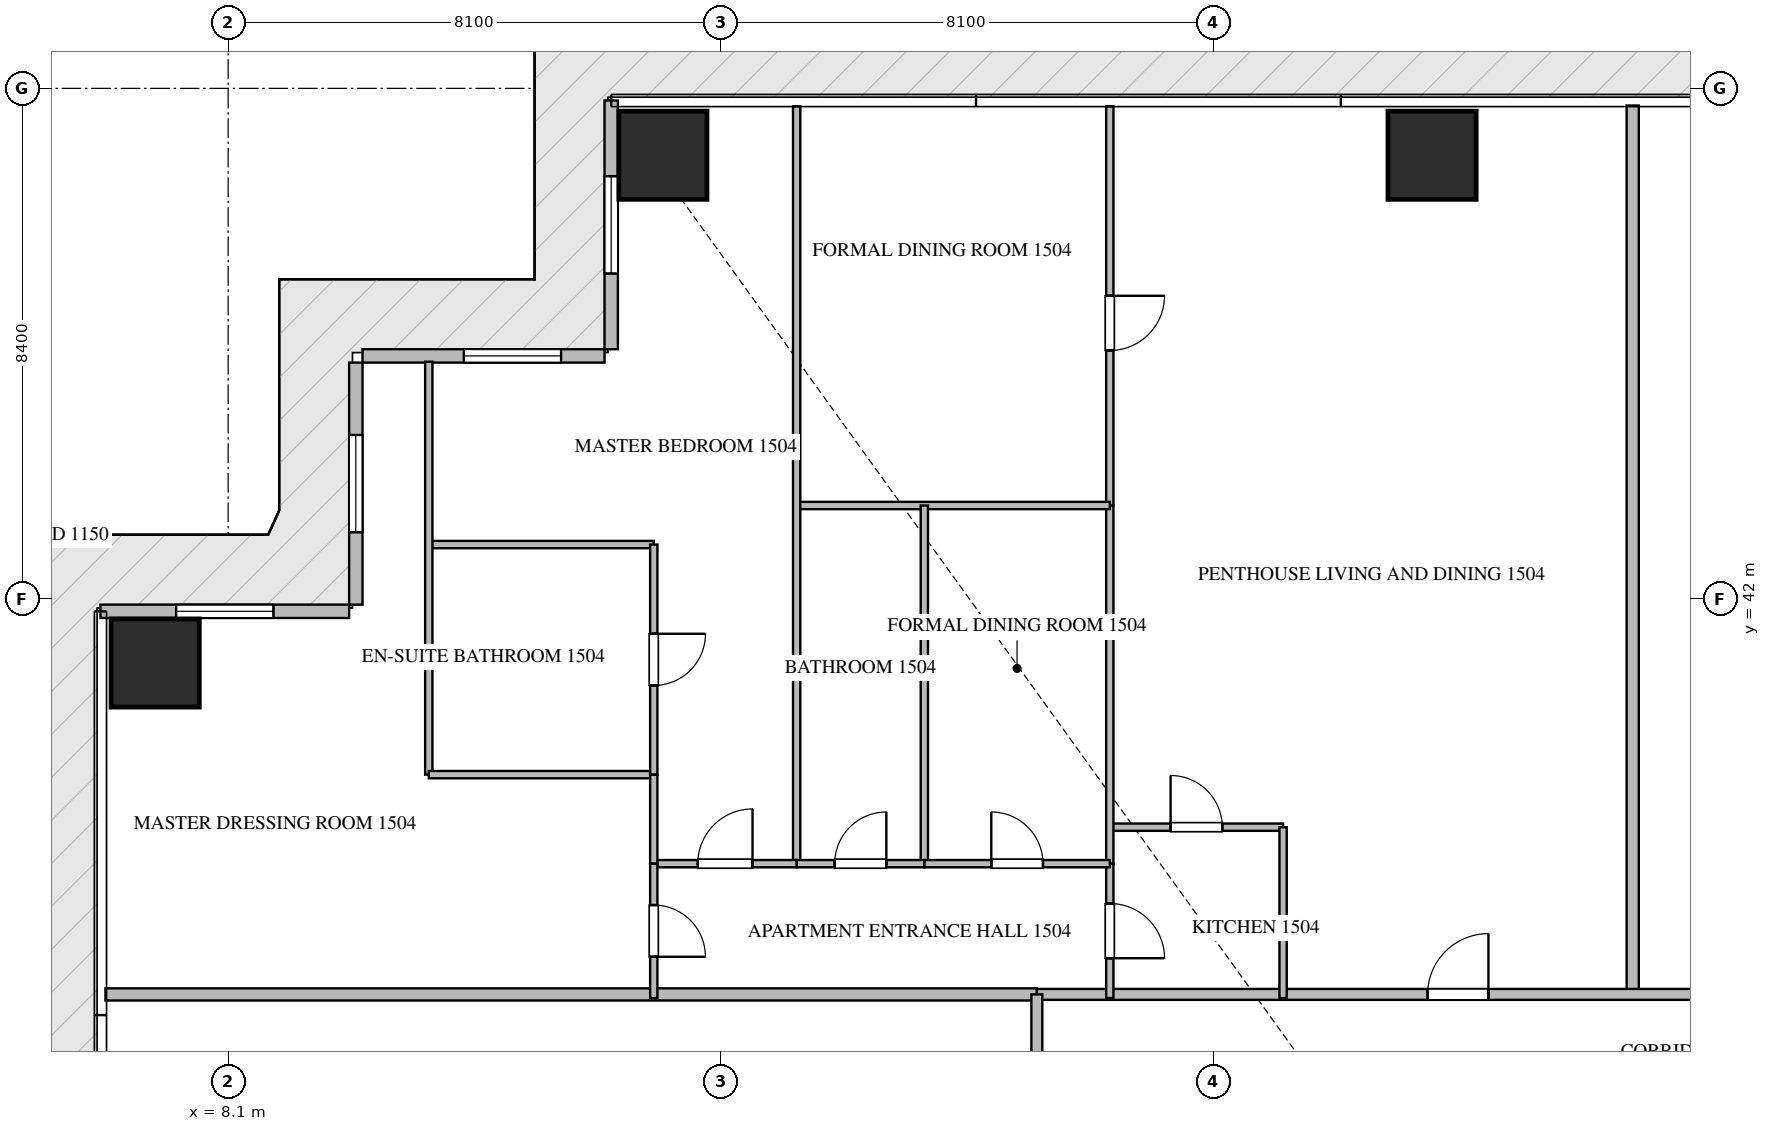
"""IFC4 building model, lengths in metres.
Left out: names, types, materials, properties, quantities, classifications, styles, units other than length and angle.
Written with IfcOpenShell. Run it as: python <this file> out.ifc"""

import sys

from ifc_helpers import new_model, si_unit, direction, frame, frame_2d, origin, origin_2d, place, context, subcontext, project, spatial, rectangle, extrude, source, transform, mapped, element, fill, save


model = new_model("IFC4")
c1 = context("Model", 3, precision=1e-05, world=origin(), true_north=direction((0.0, 1.0)))
c2 = subcontext(c1, "Body", "Model", "MODEL_VIEW")
j1 = project(units=[si_unit("LENGTHUNIT", "METRE"), si_unit("PLANEANGLEUNIT", "RADIAN")], contexts=[c1])
p1 = place(None, origin())
s1 = spatial("IfcSite", under=j1, at=p1, CompositionType="ELEMENT")
p2 = place(p1, origin())
s2 = spatial("IfcBuilding", under=s1, at=p2, CompositionType="ELEMENT")
p3 = place(p2, frame((0.0, 0.0, 64.2)))
s3 = spatial("IfcBuildingStorey", under=s2, at=p3, CompositionType="ELEMENT", Elevation=64.2)
m1 = source(origin(), c2, "Body", "SweptSolid", [
    extrude(rectangle(XDim=1.45, YDim=1.45, at=origin_2d()), origin(), (0.0, 0.0, 1.0), 3.75),
])
for number, where, z_axis, x_axis in (
    (1, (15.25, 49.3, -0.26), (0.0, 0.0, 1.0), (1.0, 0.0, 0.0)),
    (2, (27.9, 49.3, -0.26), (0.0, 0.0, 1.0), (1.0, 0.0, 0.0)),
    (3, (6.9, 40.95, -0.26), (0.0, 0.0, 1.0), (1.0, 0.0, 0.0)),
):
    element("IfcColumn", number, at=place(p3, frame(where, z_axis=z_axis, x_axis=x_axis)), inside=s3, PredefinedType="COLUMN", context=c2, shape_type="MappedRepresentation", body=[
        mapped(m1, transform((0.0, 0.0, 0.0), scale=1.0)),
    ])
p4 = place(p3, frame((14.4, 50.2, 0.0), z_axis=(0.0, 0.0, 1.0), x_axis=(0.0, -1.0, 0.0)))
e4 = element("IfcWall", 4, at=p4, inside=s3, PredefinedType="ELEMENTEDWALL", context=c2, shape_type="SweptSolid", body=[
    extrude(rectangle(XDim=4.09, YDim=0.22, at=frame_2d((2.045, 0.0))), origin(), (0.0, 0.0, 1.0), 3.475),
])
p5 = place(p4, frame((1.245, 0.0, 0.65)))
e5 = element("IfcOpeningElement", 5, at=p5, cuts=e4, PredefinedType="OPENING", context=c2, shape_type="SweptSolid", body=[
    extrude(rectangle(XDim=1.6, YDim=2.1, at=frame_2d((0.8, 1.05))), frame((0.0, 0.12, 0.0), z_axis=(0.0, -1.0, 0.0), x_axis=(1.0, 0.0, 0.0)), (0.0, 0.0, 1.0), 0.24),
])
p6 = place(p3, frame((14.29, 46.0, 0.0), z_axis=(0.0, 0.0, 1.0), x_axis=(-1.0, 0.0, 0.0)))
e6 = element("IfcWall", 6, at=p6, inside=s3, PredefinedType="ELEMENTEDWALL", context=c2, shape_type="SweptSolid", body=[
    extrude(rectangle(XDim=3.98, YDim=0.22, at=frame_2d((1.99, 0.0))), origin(), (0.0, 0.0, 1.0), 3.475),
])
p7 = place(p6, frame((0.714, 0.0, 0.65)))
e7 = element("IfcOpeningElement", 7, at=p7, cuts=e6, PredefinedType="OPENING", context=c2, shape_type="SweptSolid", body=[
    extrude(rectangle(XDim=1.6, YDim=2.1, at=frame_2d((0.8, 1.05))), frame((0.0, 0.12, 0.0), z_axis=(0.0, -1.0, 0.0), x_axis=(1.0, 0.0, 0.0)), (0.0, 0.0, 1.0), 0.24),
])
p8 = place(p3, frame((10.2, 45.89, 0.0), z_axis=(0.0, 0.0, 1.0), x_axis=(0.0, -1.0, 0.0)))
e8 = element("IfcWall", 8, at=p8, inside=s3, PredefinedType="ELEMENTEDWALL", context=c2, shape_type="SweptSolid", body=[
    extrude(rectangle(XDim=3.98, YDim=0.22, at=frame_2d((1.99, 0.0))), origin(), (0.0, 0.0, 1.0), 3.475),
])
p9 = place(p8, frame((1.19, 0.0, 0.65)))
e9 = element("IfcOpeningElement", 9, at=p9, cuts=e8, PredefinedType="OPENING", context=c2, shape_type="SweptSolid", body=[
    extrude(rectangle(XDim=1.6, YDim=2.1, at=frame_2d((0.8, 1.05))), frame((0.0, 0.12, 0.0), z_axis=(0.0, -1.0, 0.0), x_axis=(1.0, 0.0, 0.0)), (0.0, 0.0, 1.0), 0.24),
])
p10 = place(p3, frame((10.09, 41.8, 0.0), z_axis=(0.0, 0.0, 1.0), x_axis=(-1.0, 0.0, 0.0)))
e10 = element("IfcWall", 10, at=p10, inside=s3, PredefinedType="ELEMENTEDWALL", context=c2, shape_type="SweptSolid", body=[
    extrude(rectangle(XDim=4.09, YDim=0.22, at=frame_2d((2.045, 0.0))), origin(), (0.0, 0.0, 1.0), 3.475),
])
p11 = place(p10, frame((1.245, 0.0, 0.65)))
e11 = element("IfcOpeningElement", 11, at=p11, cuts=e10, PredefinedType="OPENING", context=c2, shape_type="SweptSolid", body=[
    extrude(rectangle(XDim=1.6, YDim=2.1, at=frame_2d((0.8, 1.05))), frame((0.0, 0.12, 0.0), z_axis=(0.0, -1.0, 0.0), x_axis=(1.0, 0.0, 0.0)), (0.0, 0.0, 1.0), 0.24),
])
p12 = place(p3, frame((31.2, 35.5, 0.0), z_axis=(0.0, 0.0, 1.0), x_axis=(0.0, 1.0, 0.0)))
e12 = element("IfcWall", 12, at=p12, inside=s3, PredefinedType="PARTITIONING", context=c2, shape_type="SweptSolid", body=[
    extrude(rectangle(XDim=14.618, YDim=0.2, at=frame_2d((7.309, 0.0))), origin(), (0.0, 0.0, 1.0), 3.49),
])
p13 = place(p3, frame((6.082, 35.5, 0.0), z_axis=(0.0, 0.0, 1.0), x_axis=(1.0, 0.0, 0.0)))
e13 = element("IfcWall", 13, at=p13, inside=s3, PredefinedType="PARTITIONING", context=c2, shape_type="SweptSolid", body=[
    extrude(rectangle(XDim=15.318, YDim=0.2, at=frame_2d((7.659, 0.0))), origin(), (0.0, 0.0, 1.0), 3.49),
])
p14 = place(p3, frame((21.402, 35.5, 0.0), z_axis=(0.0, 0.0, 1.0), x_axis=(1.0, 0.0, 0.0)))
e14 = element("IfcWall", 14, at=p14, inside=s3, PredefinedType="PARTITIONING", context=c2, shape_type="SweptSolid", body=[
    extrude(rectangle(XDim=21.996, YDim=0.18, at=frame_2d((10.998, 0.0))), origin(), (0.0, 0.0, 1.0), 3.49),
])
p15 = place(p14, frame((6.425, 0.0, 0.0)))
e15 = element("IfcOpeningElement", 15, at=p15, cuts=e14, PredefinedType="OPENING", context=c2, shape_type="SweptSolid", body=[
    extrude(rectangle(XDim=1.0, YDim=2.15, at=frame_2d((0.5, 1.075))), frame((0.0, 0.1, 0.0), z_axis=(0.0, -1.0, 0.0), x_axis=(1.0, 0.0, 0.0)), (0.0, 0.0, 1.0), 0.2),
])
p16 = place(p14, frame((13.605, 0.0, 0.0)))
e16 = element("IfcOpeningElement", 16, at=p16, cuts=e14, PredefinedType="OPENING", context=c2, shape_type="SweptSolid", body=[
    extrude(rectangle(XDim=1.0, YDim=2.15, at=frame_2d((0.5, 1.075))), frame((0.0, 0.1, 0.0), z_axis=(0.0, -1.0, 0.0), x_axis=(1.0, 0.0, 0.0)), (0.0, 0.0, 1.0), 0.2),
])
p17 = place(p3, frame((21.4, 14.9, 0.0), z_axis=(0.0, 0.0, 1.0), x_axis=(0.0, 1.0, 0.0)))
e17 = element("IfcWall", 17, at=p17, inside=s3, PredefinedType="PARTITIONING", context=c2, shape_type="SweptSolid", body=[
    extrude(rectangle(XDim=20.6, YDim=0.18, at=frame_2d((10.3, 0.0))), origin(), (0.0, 0.0, 1.0), 3.49),
])
p18 = place(p17, frame((5.919, 0.0, 0.0)))
e18 = element("IfcOpeningElement", 18, at=p18, cuts=e17, PredefinedType="OPENING", context=c2, shape_type="SweptSolid", body=[
    extrude(rectangle(XDim=1.0, YDim=2.15, at=frame_2d((0.5, 1.075))), frame((0.0, 0.1, 0.0), z_axis=(0.0, -1.0, 0.0), x_axis=(1.0, 0.0, 0.0)), (0.0, 0.0, 1.0), 0.2),
])
p19 = place(p17, frame((17.64, 0.0, 0.0)))
e19 = element("IfcOpeningElement", 19, at=p19, cuts=e17, PredefinedType="OPENING", context=c2, shape_type="SweptSolid", body=[
    extrude(rectangle(XDim=1.0, YDim=2.15, at=frame_2d((0.5, 1.075))), frame((0.0, 0.1, 0.0), z_axis=(0.0, -1.0, 0.0), x_axis=(1.0, 0.0, 0.0)), (0.0, 0.0, 1.0), 0.2),
])
p20 = place(p3, frame((22.6, 38.25, 0.0), z_axis=(0.0, 0.0, 1.0), x_axis=(1.0, 0.0, 0.0)))
e20 = element("IfcWall", 20, at=p20, inside=s3, PredefinedType="PARTITIONING", context=c2, shape_type="SweptSolid", body=[
    extrude(rectangle(XDim=2.85, YDim=0.12, at=frame_2d((1.425, 0.0))), origin(), (0.0, 0.0, 1.0), 3.49),
])
p21 = place(p20, frame((1.0, 0.0, 0.0)))
e21 = element("IfcOpeningElement", 21, at=p21, cuts=e20, PredefinedType="OPENING", context=c2, shape_type="SweptSolid", body=[
    extrude(rectangle(XDim=0.85, YDim=2.1, at=frame_2d((0.425, 1.05))), frame((0.0, 0.07, 0.0), z_axis=(0.0, -1.0, 0.0), x_axis=(1.0, 0.0, 0.0)), (0.0, 0.0, 1.0), 0.14),
])
p22 = place(p3, frame((25.45, 38.25, 0.0), z_axis=(0.0, 0.0, 1.0), x_axis=(0.0, -1.0, 0.0)))
e22 = element("IfcWall", 22, at=p22, inside=s3, PredefinedType="PARTITIONING", context=c2, shape_type="SweptSolid", body=[
    extrude(rectangle(XDim=2.81, YDim=0.12, at=frame_2d((1.405, 0.0))), origin(), (0.0, 0.0, 1.0), 3.49),
])
p23 = place(p3, frame((22.6, 37.65, 0.0), z_axis=(0.0, 0.0, 1.0), x_axis=(0.0, -1.0, 0.0)))
e23 = element("IfcWall", 23, at=p23, inside=s3, PredefinedType="PARTITIONING", context=c2, shape_type="SweptSolid", body=[
    extrude(rectangle(XDim=2.21, YDim=0.12, at=frame_2d((1.105, 0.0))), origin(), (0.0, 0.0, 1.0), 3.49),
])
p24 = place(p23, frame((0.655, 0.0, 0.0)))
e24 = element("IfcOpeningElement", 24, at=p24, cuts=e23, PredefinedType="OPENING", context=c2, shape_type="SweptSolid", body=[
    extrude(rectangle(XDim=0.9, YDim=2.1, at=frame_2d((0.45, 1.05))), frame((0.0, 0.07, 0.0), z_axis=(0.0, -1.0, 0.0), x_axis=(1.0, 0.0, 0.0)), (0.0, 0.0, 1.0), 0.14),
])
p25 = place(p3, frame((22.6, 50.105, 0.0), z_axis=(0.0, 0.0, 1.0), x_axis=(0.0, -1.0, 0.0)))
e25 = element("IfcWall", 25, at=p25, inside=s3, PredefinedType="PARTITIONING", context=c2, shape_type="SweptSolid", body=[
    extrude(rectangle(XDim=6.565, YDim=0.12, at=frame_2d((3.282, 0.0))), origin(), (0.0, 0.0, 1.0), 3.49),
])
p26 = place(p25, frame((3.116, 0.0, 0.0)))
e26 = element("IfcOpeningElement", 26, at=p26, cuts=e25, PredefinedType="OPENING", context=c2, shape_type="SweptSolid", body=[
    extrude(rectangle(XDim=0.9, YDim=2.1, at=frame_2d((0.45, 1.05))), frame((0.0, 0.07, 0.0), z_axis=(0.0, -1.0, 0.0), x_axis=(1.0, 0.0, 0.0)), (0.0, 0.0, 1.0), 0.14),
])
p27 = place(p3, frame((22.6, 43.538, 0.0), z_axis=(0.0, 0.0, 1.0), x_axis=(0.0, -1.0, 0.0)))
e27 = element("IfcWall", 27, at=p27, inside=s3, PredefinedType="PARTITIONING", context=c2, shape_type="SweptSolid", body=[
    extrude(rectangle(XDim=5.886, YDim=0.12, at=frame_2d((2.943, 0.0))), origin(), (0.0, 0.0, 1.0), 3.49),
])
p28 = place(p3, frame((17.45, 43.54, 0.0), z_axis=(0.0, 0.0, 1.0), x_axis=(1.0, 0.0, 0.0)))
e28 = element("IfcWall", 28, at=p28, inside=s3, PredefinedType="PARTITIONING", context=c2, shape_type="SweptSolid", body=[
    extrude(rectangle(XDim=5.15, YDim=0.12, at=frame_2d((2.575, 0.0))), origin(), (0.0, 0.0, 1.0), 3.49),
])
p29 = place(p3, frame((17.45, 50.105, 0.0), z_axis=(0.0, 0.0, 1.0), x_axis=(0.0, -1.0, 0.0)))
e29 = element("IfcWall", 29, at=p29, inside=s3, PredefinedType="PARTITIONING", context=c2, shape_type="SweptSolid", body=[
    extrude(rectangle(XDim=12.455, YDim=0.12, at=frame_2d((6.228, 0.0))), origin(), (0.0, 0.0, 1.0), 3.49),
])
p30 = place(p3, frame((19.55, 43.54, 0.0), z_axis=(0.0, 0.0, 1.0), x_axis=(0.0, -1.0, 0.0)))
e30 = element("IfcWall", 30, at=p30, inside=s3, PredefinedType="PARTITIONING", context=c2, shape_type="SweptSolid", body=[
    extrude(rectangle(XDim=5.89, YDim=0.12, at=frame_2d((2.945, 0.0))), origin(), (0.0, 0.0, 1.0), 3.49),
])
p31 = place(p3, frame((17.45, 37.65, 0.0), z_axis=(0.0, 0.0, 1.0), x_axis=(1.0, 0.0, 0.0)))
e31 = element("IfcWall", 31, at=p31, inside=s3, PredefinedType="PARTITIONING", context=c2, shape_type="SweptSolid", body=[
    extrude(rectangle(XDim=2.1, YDim=0.12, at=frame_2d((1.05, 0.0))), origin(), (0.0, 0.0, 1.0), 3.49),
])
p32 = place(p31, frame((0.625, 0.0, 0.0)))
e32 = element("IfcOpeningElement", 32, at=p32, cuts=e31, PredefinedType="OPENING", context=c2, shape_type="SweptSolid", body=[
    extrude(rectangle(XDim=0.85, YDim=2.1, at=frame_2d((0.425, 1.05))), frame((0.0, 0.07, 0.0), z_axis=(0.0, -1.0, 0.0), x_axis=(1.0, 0.0, 0.0)), (0.0, 0.0, 1.0), 0.14),
])
p33 = place(p3, frame((19.552, 37.65, 0.0), z_axis=(0.0, 0.0, 1.0), x_axis=(1.0, 0.0, 0.0)))
e33 = element("IfcWall", 33, at=p33, inside=s3, PredefinedType="PARTITIONING", context=c2, shape_type="SweptSolid", body=[
    extrude(rectangle(XDim=3.048, YDim=0.12, at=frame_2d((1.524, 0.0))), origin(), (0.0, 0.0, 1.0), 3.49),
])
p34 = place(p33, frame((1.099, 0.0, 0.0)))
e34 = element("IfcOpeningElement", 34, at=p34, cuts=e33, PredefinedType="OPENING", context=c2, shape_type="SweptSolid", body=[
    extrude(rectangle(XDim=0.85, YDim=2.1, at=frame_2d((0.425, 1.05))), frame((0.0, 0.07, 0.0), z_axis=(0.0, -1.0, 0.0), x_axis=(1.0, 0.0, 0.0)), (0.0, 0.0, 1.0), 0.14),
])
p35 = place(p3, frame((15.1, 37.65, 0.0), z_axis=(0.0, 0.0, 1.0), x_axis=(1.0, 0.0, 0.0)))
e35 = element("IfcWall", 35, at=p35, inside=s3, PredefinedType="PARTITIONING", context=c2, shape_type="SweptSolid", body=[
    extrude(rectangle(XDim=2.348, YDim=0.12, at=frame_2d((1.174, 0.0))), origin(), (0.0, 0.0, 1.0), 3.49),
])
p36 = place(p35, frame((0.724, 0.0, 0.0)))
e36 = element("IfcOpeningElement", 36, at=p36, cuts=e35, PredefinedType="OPENING", context=c2, shape_type="SweptSolid", body=[
    extrude(rectangle(XDim=0.9, YDim=2.1, at=frame_2d((0.45, 1.05))), frame((0.0, 0.07, 0.0), z_axis=(0.0, -1.0, 0.0), x_axis=(1.0, 0.0, 0.0)), (0.0, 0.0, 1.0), 0.14),
])
p37 = place(p3, frame((11.4, 42.898, 0.0), z_axis=(0.0, 0.0, 1.0), x_axis=(1.0, 0.0, 0.0)))
e37 = element("IfcWall", 37, at=p37, inside=s3, PredefinedType="PARTITIONING", context=c2, shape_type="SweptSolid", body=[
    extrude(rectangle(XDim=3.7, YDim=0.12, at=frame_2d((1.85, 0.0))), origin(), (0.0, 0.0, 1.0), 3.49),
])
p38 = place(p3, frame((11.4, 45.905, 0.0), z_axis=(0.0, 0.0, 1.0), x_axis=(0.0, -1.0, 0.0)))
e38 = element("IfcWall", 38, at=p38, inside=s3, PredefinedType="PARTITIONING", context=c2, shape_type="SweptSolid", body=[
    extrude(rectangle(XDim=6.791, YDim=0.12, at=frame_2d((3.396, 0.0))), origin(), (0.0, 0.0, 1.0), 3.49),
])
p39 = place(p3, frame((11.4, 39.114, 0.0), z_axis=(0.0, 0.0, 1.0), x_axis=(1.0, 0.0, 0.0)))
e39 = element("IfcWall", 39, at=p39, inside=s3, PredefinedType="PARTITIONING", context=c2, shape_type="SweptSolid", body=[
    extrude(rectangle(XDim=3.7, YDim=0.12, at=frame_2d((1.85, 0.0))), origin(), (0.0, 0.0, 1.0), 3.49),
])
p40 = place(p3, frame((15.1, 42.898, 0.0), z_axis=(0.0, 0.0, 1.0), x_axis=(0.0, -1.0, 0.0)))
e40 = element("IfcWall", 40, at=p40, inside=s3, PredefinedType="PARTITIONING", context=c2, shape_type="SweptSolid", body=[
    extrude(rectangle(XDim=3.784, YDim=0.12, at=frame_2d((1.892, 0.0))), origin(), (0.0, 0.0, 1.0), 2.922),
])
p41 = place(p40, frame((1.467, 0.0, 0.0)))
e41 = element("IfcOpeningElement", 41, at=p41, cuts=e40, PredefinedType="OPENING", context=c2, shape_type="SweptSolid", body=[
    extrude(rectangle(XDim=0.85, YDim=2.1, at=frame_2d((0.425, 1.05))), frame((0.0, 0.07, 0.0), z_axis=(0.0, -1.0, 0.0), x_axis=(1.0, 0.0, 0.0)), (0.0, 0.0, 1.0), 0.14),
])
p42 = place(p3, frame((15.1, 39.112, 0.0), z_axis=(0.0, 0.0, 1.0), x_axis=(0.0, -1.0, 0.0)))
e42 = element("IfcWall", 42, at=p42, inside=s3, PredefinedType="PARTITIONING", context=c2, shape_type="SweptSolid", body=[
    extrude(rectangle(XDim=1.462, YDim=0.12, at=frame_2d((0.731, 0.0))), origin(), (0.0, 0.0, 1.0), 2.922),
])
p43 = place(p3, frame((15.1, 37.648, 0.0), z_axis=(0.0, 0.0, 1.0), x_axis=(0.0, -1.0, 0.0)))
e43 = element("IfcWall", 43, at=p43, inside=s3, PredefinedType="PARTITIONING", context=c2, shape_type="SweptSolid", body=[
    extrude(rectangle(XDim=2.208, YDim=0.12, at=frame_2d((1.104, 0.0))), origin(), (0.0, 0.0, 1.0), 2.922),
])
p44 = place(p43, frame((0.679, 0.0, 0.0)))
e44 = element("IfcOpeningElement", 44, at=p44, cuts=e43, PredefinedType="OPENING", context=c2, shape_type="SweptSolid", body=[
    extrude(rectangle(XDim=0.85, YDim=2.1, at=frame_2d((0.425, 1.05))), frame((0.0, 0.07, 0.0), z_axis=(0.0, -1.0, 0.0), x_axis=(1.0, 0.0, 0.0)), (0.0, 0.0, 1.0), 0.14),
])
m2 = source(origin(), c2, "Body", "SweptSolid", [
    extrude(rectangle(XDim=1.6, YDim=2.1, at=frame_2d((0.8, 1.05))), frame((0.0, 0.03, 0.0), z_axis=(0.0, -1.0, 0.0), x_axis=(1.0, 0.0, 0.0)), (0.0, 0.0, 1.0), 0.06),
])
p45 = place(p5, origin())
e45 = element("IfcWindow", 45, at=p45, inside=s3, PartitioningType="SINGLE_PANEL", PredefinedType="WINDOW", context=c2, shape_type="MappedRepresentation", body=[
    mapped(m2, transform((0.0, 0.0, 0.0), scale=1.0)),
])
fill(e5, e45)
p46 = place(p7, origin())
e46 = element("IfcWindow", 46, at=p46, inside=s3, PartitioningType="SINGLE_PANEL", PredefinedType="WINDOW", context=c2, shape_type="MappedRepresentation", body=[
    mapped(m2, transform((0.0, 0.0, 0.0), scale=1.0)),
])
fill(e7, e46)
p47 = place(p9, origin())
e47 = element("IfcWindow", 47, at=p47, inside=s3, PartitioningType="SINGLE_PANEL", PredefinedType="WINDOW", context=c2, shape_type="MappedRepresentation", body=[
    mapped(m2, transform((0.0, 0.0, 0.0), scale=1.0)),
])
fill(e9, e47)
p48 = place(p11, origin())
e48 = element("IfcWindow", 48, at=p48, inside=s3, PartitioningType="SINGLE_PANEL", PredefinedType="WINDOW", context=c2, shape_type="MappedRepresentation", body=[
    mapped(m2, transform((0.0, 0.0, 0.0), scale=1.0)),
])
fill(e11, e48)
m3 = source(origin(), c2, "Body", "SweptSolid", [
    extrude(rectangle(XDim=1.0, YDim=2.15, at=frame_2d((0.5, 1.075))), frame((0.0, 0.025, 0.0), z_axis=(0.0, -1.0, 0.0), x_axis=(1.0, 0.0, 0.0)), (0.0, 0.0, 1.0), 0.05),
])
p49 = place(p15, origin())
e49 = element("IfcDoor", 49, at=p49, inside=s3, OperationType="SINGLE_SWING_RIGHT", PredefinedType="DOOR", context=c2, shape_type="MappedRepresentation", body=[
    mapped(m3, transform((0.0, 0.0, 0.0), scale=1.0)),
])
fill(e15, e49)
m4 = source(origin(), c2, "Body", "SweptSolid", [
    extrude(rectangle(XDim=0.85, YDim=2.1, at=frame_2d((0.425, 1.05))), frame((0.0, 0.025, 0.0), z_axis=(0.0, -1.0, 0.0), x_axis=(1.0, 0.0, 0.0)), (0.0, 0.0, 1.0), 0.05),
])
p50 = place(p21, origin())
e50 = element("IfcDoor", 50, at=p50, inside=s3, OperationType="SINGLE_SWING_LEFT", PredefinedType="DOOR", context=c2, shape_type="MappedRepresentation", body=[
    mapped(m4, transform((0.0, 0.0, 0.0), scale=1.0)),
])
fill(e21, e50)
m5 = source(origin(), c2, "Body", "SweptSolid", [
    extrude(rectangle(XDim=0.9, YDim=2.1, at=frame_2d((0.45, 1.05))), frame((0.0, 0.025, 0.0), z_axis=(0.0, -1.0, 0.0), x_axis=(1.0, 0.0, 0.0)), (0.0, 0.0, 1.0), 0.05),
])
p51 = place(p24, origin())
e51 = element("IfcDoor", 51, at=p51, inside=s3, OperationType="SINGLE_SWING_RIGHT", PredefinedType="DOOR", context=c2, shape_type="MappedRepresentation", body=[
    mapped(m5, transform((0.0, 0.0, 0.0), scale=1.0)),
])
fill(e24, e51)
p52 = place(p26, origin())
e52 = element("IfcDoor", 52, at=p52, inside=s3, OperationType="SINGLE_SWING_LEFT", PredefinedType="DOOR", context=c2, shape_type="MappedRepresentation", body=[
    mapped(m5, transform((0.0, 0.0, 0.0), scale=1.0)),
])
fill(e26, e52)
p53 = place(p32, origin())
e53 = element("IfcDoor", 53, at=p53, inside=s3, OperationType="SINGLE_SWING_RIGHT", PredefinedType="DOOR", context=c2, shape_type="MappedRepresentation", body=[
    mapped(m4, transform((0.0, 0.0, 0.0), scale=1.0)),
])
fill(e32, e53)
p54 = place(p34, origin())
e54 = element("IfcDoor", 54, at=p54, inside=s3, OperationType="SINGLE_SWING_LEFT", PredefinedType="DOOR", context=c2, shape_type="MappedRepresentation", body=[
    mapped(m4, transform((0.0, 0.0, 0.0), scale=1.0)),
])
fill(e34, e54)
p55 = place(p36, origin())
e55 = element("IfcDoor", 55, at=p55, inside=s3, OperationType="SINGLE_SWING_RIGHT", PredefinedType="DOOR", context=c2, shape_type="MappedRepresentation", body=[
    mapped(m5, transform((0.0, 0.0, 0.0), scale=1.0)),
])
fill(e36, e55)
p56 = place(p41, origin())
e56 = element("IfcDoor", 56, at=p56, inside=s3, OperationType="SINGLE_SWING_LEFT", PredefinedType="DOOR", context=c2, shape_type="MappedRepresentation", body=[
    mapped(m4, transform((0.0, 0.0, 0.0), scale=1.0)),
])
fill(e41, e56)
p57 = place(p44, origin())
e57 = element("IfcDoor", 57, at=p57, inside=s3, OperationType="SINGLE_SWING_RIGHT", PredefinedType="DOOR", context=c2, shape_type="MappedRepresentation", body=[
    mapped(m4, transform((0.0, 0.0, 0.0), scale=1.0)),
])
fill(e44, e57)
save(model, sys.argv[1])
